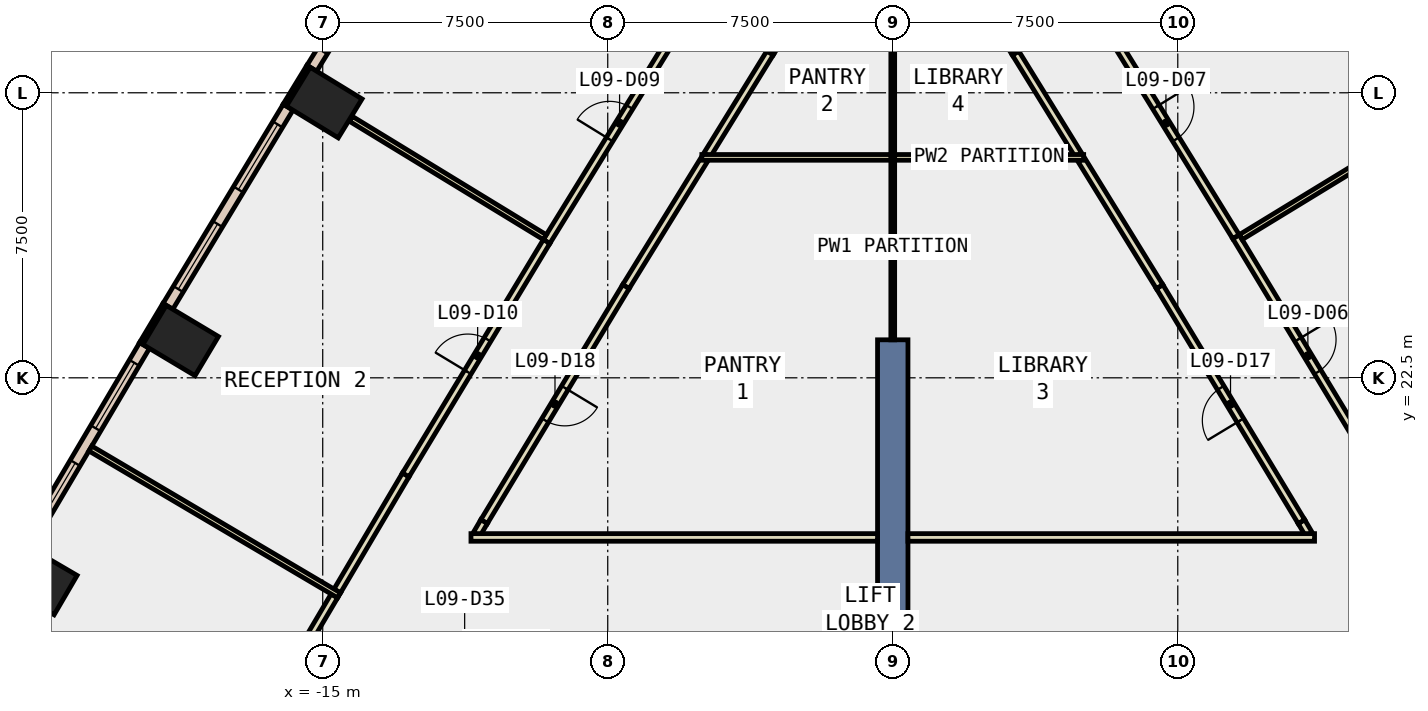
"""IFC4 building model, lengths in metres.
Left out: names, types, materials, properties, quantities, classifications, styles, units other than length and angle.
Written with IfcOpenShell. Run it as: python <this file> out.ifc"""

import sys

from ifc_helpers import new_model, si_unit, direction, frame, frame_2d, origin, origin_2d, place, context, subcontext, project, spatial, rectangle, extrude, element, fill, save


model = new_model("IFC4")
c1 = context("Model", 3, precision=1e-05, world=origin(), true_north=direction((0.0, 1.0)))
c2 = subcontext(c1, "Body", "Model", "MODEL_VIEW")
j1 = project(units=[si_unit("LENGTHUNIT", "METRE"), si_unit("PLANEANGLEUNIT", "RADIAN")], contexts=[c1])
p1 = place(None, origin())
s1 = spatial("IfcSite", under=j1, at=p1, CompositionType="ELEMENT")
p2 = place(p1, origin())
s2 = spatial("IfcBuilding", under=s1, at=p2, CompositionType="ELEMENT")
p3 = place(p2, frame((0.0, 0.0, 47.6)))
s3 = spatial("IfcBuildingStorey", under=s2, at=p3, CompositionType="ELEMENT", Elevation=47.6)
for number, where, z_axis, x_axis in (
    (1, (-14.961, 29.743, -0.4), (0.0, 0.0, 1.0), (0.522, 0.853, 0.0)),
    (2, (-18.739, 23.482, -0.4), (0.0, 0.0, 1.0), (0.513, 0.858, 0.0)),
    (3, (-22.457, 17.186, -0.4), (0.0, 0.0, 1.0), (0.504, 0.864, 0.0)),
):
    element("IfcColumn", number, at=place(p3, frame(where, z_axis=z_axis, x_axis=x_axis)), inside=s3, PredefinedType="COLUMN", context=c2, shape_type="SweptSolid", body=[
        extrude(rectangle(XDim=1.2, YDim=1.6, at=origin_2d()), origin(), (0.0, 0.0, 1.0), 4.2),
    ])
p4 = place(p3, frame((0.0, 14.5, -0.4), z_axis=(0.0, 0.0, 1.0), x_axis=(0.0, 1.0, 0.0)))
e4 = element("IfcWall", 4, at=p4, inside=s3, PredefinedType="SHEAR", context=c2, shape_type="SweptSolid", body=[
    extrude(rectangle(XDim=9.0, YDim=0.8, at=frame_2d((4.5, 0.0))), origin(), (0.0, 0.0, 1.0), 4.2),
])
for number, where, z_axis, x_axis in (
    (5, (-15.373, 30.698, 0.0), (0.0, 0.0, 1.0), (-0.522, -0.853, 0.0)),
    (6, (-19.161, 24.433, 0.0), (0.0, 0.0, 1.0), (-0.513, -0.858, 0.0)),
):
    element("IfcWall", number, at=place(p3, frame(where, z_axis=z_axis, x_axis=x_axis)), inside=s3, PredefinedType="STANDARD", context=c2, shape_type="SweptSolid", body=[
        extrude(rectangle(XDim=1.2, YDim=0.1, at=frame_2d((0.6, 0.0))), origin(), (0.0, 0.0, 1.0), 3.8),
    ])
p5 = place(p3, frame((15.287, 30.644, 0.0), z_axis=(0.0, 0.0, 1.0), x_axis=(-0.525114088226, 0.851031840971, 0.0)))
e7 = element("IfcWall", 7, at=p5, inside=s3, PredefinedType="STANDARD", context=c2, shape_type="SweptSolid", body=[
    extrude(rectangle(XDim=6.121, YDim=0.3, at=frame_2d((3.061, 0.0))), origin(), (0.0, 0.0, 1.0), 3.8),
])
p6 = place(p5, frame((0.53, 0.0, 0.0)))
e8 = element("IfcOpeningElement", 8, at=p6, cuts=e7, PredefinedType="OPENING", context=c2, shape_type="SweptSolid", body=[
    extrude(rectangle(XDim=2.0, YDim=2.4, at=frame_2d((1.0, 1.2))), frame((0.0, 0.16, 0.0), z_axis=(0.0, -1.0, 0.0), x_axis=(1.0, 0.0, 0.0)), (0.0, 0.0, 1.0), 0.32),
])
p7 = place(p5, frame((3.591, 0.0, 0.9)))
e9 = element("IfcOpeningElement", 9, at=p7, cuts=e7, PredefinedType="OPENING", context=c2, shape_type="SweptSolid", body=[
    extrude(rectangle(XDim=2.0, YDim=2.6, at=frame_2d((1.0, 1.3))), frame((0.0, 0.16, 0.0), z_axis=(0.0, -1.0, 0.0), x_axis=(1.0, 0.0, 0.0)), (0.0, 0.0, 1.0), 0.32),
])
p8 = place(p3, frame((-12.073, 35.853, 0.0), z_axis=(0.0, 0.0, 1.0), x_axis=(-0.525114088226, -0.851031840971, 0.0)))
e10 = element("IfcWall", 10, at=p8, inside=s3, PredefinedType="STANDARD", context=c2, shape_type="SweptSolid", body=[
    extrude(rectangle(XDim=6.121, YDim=0.3, at=frame_2d((3.061, 0.0))), origin(), (0.0, 0.0, 1.0), 3.8),
])
p9 = place(p8, frame((0.53, 0.0, 0.9)))
e11 = element("IfcOpeningElement", 11, at=p9, cuts=e10, PredefinedType="OPENING", context=c2, shape_type="SweptSolid", body=[
    extrude(rectangle(XDim=2.0, YDim=2.6, at=frame_2d((1.0, 1.3))), frame((0.0, 0.16, 0.0), z_axis=(0.0, -1.0, 0.0), x_axis=(1.0, 0.0, 0.0)), (0.0, 0.0, 1.0), 0.32),
])
p10 = place(p8, frame((3.591, 0.0, 0.9)))
e12 = element("IfcOpeningElement", 12, at=p10, cuts=e10, PredefinedType="OPENING", context=c2, shape_type="SweptSolid", body=[
    extrude(rectangle(XDim=2.0, YDim=2.6, at=frame_2d((1.0, 1.3))), frame((0.0, 0.16, 0.0), z_axis=(0.0, -1.0, 0.0), x_axis=(1.0, 0.0, 0.0)), (0.0, 0.0, 1.0), 0.32),
])
p11 = place(p3, frame((-15.911, 29.621, 0.0), z_axis=(0.0, 0.0, 1.0), x_axis=(-0.516699243123, -0.856166976796, 0.0)))
e13 = element("IfcWall", 13, at=p11, inside=s3, PredefinedType="STANDARD", context=c2, shape_type="SweptSolid", body=[
    extrude(rectangle(XDim=6.122, YDim=0.3, at=frame_2d((3.061, 0.0))), origin(), (0.0, 0.0, 1.0), 3.8),
])
p12 = place(p11, frame((0.53, 0.0, 0.9)))
e14 = element("IfcOpeningElement", 14, at=p12, cuts=e13, PredefinedType="OPENING", context=c2, shape_type="SweptSolid", body=[
    extrude(rectangle(XDim=2.0, YDim=2.6, at=frame_2d((1.0, 1.3))), frame((0.0, 0.16, 0.0), z_axis=(0.0, -1.0, 0.0), x_axis=(1.0, 0.0, 0.0)), (0.0, 0.0, 1.0), 0.32),
])
p13 = place(p11, frame((3.591, 0.0, 0.9)))
e15 = element("IfcOpeningElement", 15, at=p13, cuts=e13, PredefinedType="OPENING", context=c2, shape_type="SweptSolid", body=[
    extrude(rectangle(XDim=2.0, YDim=2.6, at=frame_2d((1.0, 1.3))), frame((0.0, 0.16, 0.0), z_axis=(0.0, -1.0, 0.0), x_axis=(1.0, 0.0, 0.0)), (0.0, 0.0, 1.0), 0.32),
])
p14 = place(p3, frame((-19.688, 23.351, 0.0), z_axis=(0.0, 0.0, 1.0), x_axis=(-0.508412153373, -0.861113861404, 0.0)))
e16 = element("IfcWall", 16, at=p14, inside=s3, PredefinedType="STANDARD", context=c2, shape_type="SweptSolid", body=[
    extrude(rectangle(XDim=6.121, YDim=0.3, at=frame_2d((3.061, 0.0))), origin(), (0.0, 0.0, 1.0), 3.8),
])
p15 = place(p14, frame((0.53, 0.0, 0.9)))
e17 = element("IfcOpeningElement", 17, at=p15, cuts=e16, PredefinedType="OPENING", context=c2, shape_type="SweptSolid", body=[
    extrude(rectangle(XDim=2.0, YDim=2.6, at=frame_2d((1.0, 1.3))), frame((0.0, 0.16, 0.0), z_axis=(0.0, -1.0, 0.0), x_axis=(1.0, 0.0, 0.0)), (0.0, 0.0, 1.0), 0.32),
])
p16 = place(p14, frame((3.591, 0.0, 0.9)))
e18 = element("IfcOpeningElement", 18, at=p16, cuts=e16, PredefinedType="OPENING", context=c2, shape_type="SweptSolid", body=[
    extrude(rectangle(XDim=2.0, YDim=2.6, at=frame_2d((1.0, 1.3))), frame((0.0, 0.16, 0.0), z_axis=(0.0, -1.0, 0.0), x_axis=(1.0, 0.0, 0.0)), (0.0, 0.0, 1.0), 0.32),
])
p17 = place(p3, frame((10.948, 18.386, 0.0), z_axis=(0.0, 0.0, 1.0), x_axis=(-0.506880801681, 0.862016155815, 0.0)))
e19 = element("IfcWall", 19, at=p17, inside=s3, PredefinedType="PARTITIONING", context=c2, shape_type="SweptSolid", body=[
    extrude(rectangle(XDim=0.383, YDim=0.2, at=frame_2d((0.191, 0.0))), origin(), (0.0, 0.0, 1.0), 3.8),
])
p18 = place(p3, frame((10.754, 18.716, 0.0), z_axis=(0.0, 0.0, 1.0), x_axis=(-0.516755973305, 0.856132737403, 0.0)))
e20 = element("IfcWall", 20, at=p18, inside=s3, PredefinedType="PARTITIONING", context=c2, shape_type="SweptSolid", body=[
    extrude(rectangle(XDim=7.222, YDim=0.2, at=frame_2d((3.611, 0.0))), origin(), (0.0, 0.0, 1.0), 3.8),
])
p19 = place(p18, frame((3.111, 0.0, 0.0)))
e21 = element("IfcOpeningElement", 21, at=p19, cuts=e20, PredefinedType="OPENING", context=c2, shape_type="SweptSolid", body=[
    extrude(rectangle(XDim=1.0, YDim=2.1, at=frame_2d((0.5, 1.05))), frame((0.0, 0.11, 0.0), z_axis=(0.0, -1.0, 0.0), x_axis=(1.0, 0.0, 0.0)), (0.0, 0.0, 1.0), 0.22),
])
for number, where, z_axis, x_axis in (
    (22, (7.022, 24.899, 0.0), (0.0, 0.0, 1.0), (-0.525, 0.851, 0.0)),
    (23, (-4.963, 28.236, 0.0), (0.0, 0.0, 1.0), (-0.525, -0.851, 0.0)),
):
    element("IfcWall", number, at=place(p3, frame(where, z_axis=z_axis, x_axis=x_axis)), inside=s3, PredefinedType="PARTITIONING", context=c2, shape_type="SweptSolid", body=[
        extrude(rectangle(XDim=3.921, YDim=0.2, at=frame_2d((1.961, 0.0))), origin(), (0.0, 0.0, 1.0), 3.8),
    ])
p20 = place(p3, frame((-7.022, 24.899, 0.0), z_axis=(0.0, 0.0, 1.0), x_axis=(-0.516755973305, -0.856132737403, 0.0)))
e24 = element("IfcWall", 24, at=p20, inside=s3, PredefinedType="PARTITIONING", context=c2, shape_type="SweptSolid", body=[
    extrude(rectangle(XDim=7.222, YDim=0.2, at=frame_2d((3.611, 0.0))), origin(), (0.0, 0.0, 1.0), 3.8),
])
p21 = place(p20, frame((3.111, 0.0, 0.0)))
e25 = element("IfcOpeningElement", 25, at=p21, cuts=e24, PredefinedType="OPENING", context=c2, shape_type="SweptSolid", body=[
    extrude(rectangle(XDim=1.0, YDim=2.1, at=frame_2d((0.5, 1.05))), frame((0.0, 0.11, 0.0), z_axis=(0.0, -1.0, 0.0), x_axis=(1.0, 0.0, 0.0)), (0.0, 0.0, 1.0), 0.22),
])
p22 = place(p3, frame((-10.754, 18.716, 0.0), z_axis=(0.0, 0.0, 1.0), x_axis=(-0.506880801681, -0.862016155815, 0.0)))
e26 = element("IfcWall", 26, at=p22, inside=s3, PredefinedType="PARTITIONING", context=c2, shape_type="SweptSolid", body=[
    extrude(rectangle(XDim=0.383, YDim=0.2, at=frame_2d((0.191, 0.0))), origin(), (0.0, 0.0, 1.0), 3.8),
])
p23 = place(p3, frame((4.885, 28.364, 0.0), z_axis=(0.0, 0.0, 1.0), x_axis=(-0.525078663571, 0.851053698107, 0.0)))
e27 = element("IfcWall", 27, at=p23, inside=s3, PredefinedType="PARTITIONING", context=c2, shape_type="SweptSolid", body=[
    extrude(rectangle(XDim=3.15, YDim=0.2, at=frame_2d((1.575, 0.0))), origin(), (0.0, 0.0, 1.0), 3.8),
])
p24 = place(p3, frame((3.231, 31.045, 0.0), z_axis=(0.0, 0.0, 1.0), x_axis=(-0.533294550084, 0.845929620507, 0.0)))
e28 = element("IfcWall", 28, at=p24, inside=s3, PredefinedType="PARTITIONING", context=c2, shape_type="SweptSolid", body=[
    extrude(rectangle(XDim=5.959, YDim=0.2, at=frame_2d((2.979, 0.0))), origin(), (0.0, 0.0, 1.0), 3.8),
])
p25 = place(p24, frame((2.479, 0.0, 0.0)))
e29 = element("IfcOpeningElement", 29, at=p25, cuts=e28, PredefinedType="OPENING", context=c2, shape_type="SweptSolid", body=[
    extrude(rectangle(XDim=1.0, YDim=2.1, at=frame_2d((0.5, 1.05))), frame((0.0, 0.11, 0.0), z_axis=(0.0, -1.0, 0.0), x_axis=(1.0, 0.0, 0.0)), (0.0, 0.0, 1.0), 0.22),
])
p26 = place(p3, frame((0.027, 36.213, 0.0), z_axis=(0.0, 0.0, 1.0), x_axis=(-0.533299680037, -0.845926386438, 0.0)))
e30 = element("IfcWall", 30, at=p26, inside=s3, PredefinedType="PARTITIONING", context=c2, shape_type="SweptSolid", body=[
    extrude(rectangle(XDim=6.109, YDim=0.2, at=frame_2d((3.055, 0.0))), origin(), (0.0, 0.0, 1.0), 3.8),
])
p27 = place(p26, frame((2.554, 0.0, 0.0)))
e31 = element("IfcOpeningElement", 31, at=p27, cuts=e30, PredefinedType="OPENING", context=c2, shape_type="SweptSolid", body=[
    extrude(rectangle(XDim=1.0, YDim=2.1, at=frame_2d((0.5, 1.05))), frame((0.0, 0.11, 0.0), z_axis=(0.0, -1.0, 0.0), x_axis=(1.0, 0.0, 0.0)), (0.0, 0.0, 1.0), 0.22),
])
p28 = place(p3, frame((-3.231, 31.045, 0.0), z_axis=(0.0, 0.0, 1.0), x_axis=(-0.525078663571, -0.851053698107, 0.0)))
e32 = element("IfcWall", 32, at=p28, inside=s3, PredefinedType="PARTITIONING", context=c2, shape_type="SweptSolid", body=[
    extrude(rectangle(XDim=3.15, YDim=0.2, at=frame_2d((1.575, 0.0))), origin(), (0.0, 0.0, 1.0), 3.8),
])
p29 = place(p3, frame((9.032, 26.213, 0.0), z_axis=(0.0, 0.0, 1.0), x_axis=(0.516789314756, -0.856112611841, 0.0)))
e33 = element("IfcWall", 33, at=p29, inside=s3, PredefinedType="PARTITIONING", context=c2, shape_type="SweptSolid", body=[
    extrude(rectangle(XDim=7.32, YDim=0.2, at=frame_2d((3.66, 0.0))), origin(), (0.0, 0.0, 1.0), 3.8),
])
p30 = place(p29, frame((3.16, 0.0, 0.0)))
e34 = element("IfcOpeningElement", 34, at=p30, cuts=e33, PredefinedType="OPENING", context=c2, shape_type="SweptSolid", body=[
    extrude(rectangle(XDim=1.0, YDim=2.1, at=frame_2d((0.5, 1.05))), frame((0.0, 0.11, 0.0), z_axis=(0.0, -1.0, 0.0), x_axis=(1.0, 0.0, 0.0)), (0.0, 0.0, 1.0), 0.22),
])
p31 = place(p3, frame((5.267, 32.315, 0.0), z_axis=(0.0, 0.0, 1.0), x_axis=(0.524988204957, -0.851109502153, 0.0)))
e35 = element("IfcWall", 35, at=p31, inside=s3, PredefinedType="PARTITIONING", context=c2, shape_type="SweptSolid", body=[
    extrude(rectangle(XDim=7.169, YDim=0.2, at=frame_2d((3.585, 0.0))), origin(), (0.0, 0.0, 1.0), 3.8),
])
p32 = place(p31, frame((3.16, 0.0, 0.0)))
e36 = element("IfcOpeningElement", 36, at=p32, cuts=e35, PredefinedType="OPENING", context=c2, shape_type="SweptSolid", body=[
    extrude(rectangle(XDim=1.0, YDim=2.1, at=frame_2d((0.5, 1.05))), frame((0.0, 0.11, 0.0), z_axis=(0.0, -1.0, 0.0), x_axis=(1.0, 0.0, 0.0)), (0.0, 0.0, 1.0), 0.22),
])
p33 = place(p3, frame((-9.11, 26.085, 0.0), z_axis=(0.0, 0.0, 1.0), x_axis=(0.525007100846, 0.85109784635, 0.0)))
e37 = element("IfcWall", 37, at=p33, inside=s3, PredefinedType="PARTITIONING", context=c2, shape_type="SweptSolid", body=[
    extrude(rectangle(XDim=7.32, YDim=0.2, at=frame_2d((3.66, 0.0))), origin(), (0.0, 0.0, 1.0), 3.8),
])
p34 = place(p33, frame((3.16, 0.0, 0.0)))
e38 = element("IfcOpeningElement", 38, at=p34, cuts=e37, PredefinedType="OPENING", context=c2, shape_type="SweptSolid", body=[
    extrude(rectangle(XDim=1.0, YDim=2.1, at=frame_2d((0.5, 1.05))), frame((0.0, 0.11, 0.0), z_axis=(0.0, -1.0, 0.0), x_axis=(1.0, 0.0, 0.0)), (0.0, 0.0, 1.0), 0.22),
])
p35 = place(p3, frame((-14.618, 16.891, 0.0), z_axis=(0.0, 0.0, 1.0), x_axis=(0.508267810274, 0.861199067022, 0.0)))
e39 = element("IfcWall", 39, at=p35, inside=s3, PredefinedType="PARTITIONING", context=c2, shape_type="SweptSolid", body=[
    extrude(rectangle(XDim=3.547, YDim=0.2, at=frame_2d((1.774, 0.0))), origin(), (0.0, 0.0, 1.0), 3.8),
])
p36 = place(p3, frame((-12.815, 19.946, 0.0), z_axis=(0.0, 0.0, 1.0), x_axis=(0.516822021522, 0.856092867667, 0.0)))
e40 = element("IfcWall", 40, at=p36, inside=s3, PredefinedType="PARTITIONING", context=c2, shape_type="SweptSolid", body=[
    extrude(rectangle(XDim=7.171, YDim=0.2, at=frame_2d((3.585, 0.0))), origin(), (0.0, 0.0, 1.0), 3.8),
])
p37 = place(p36, frame((3.16, 0.0, 0.0)))
e41 = element("IfcOpeningElement", 41, at=p37, cuts=e40, PredefinedType="OPENING", context=c2, shape_type="SweptSolid", body=[
    extrude(rectangle(XDim=1.0, YDim=2.1, at=frame_2d((0.5, 1.05))), frame((0.0, 0.11, 0.0), z_axis=(0.0, -1.0, 0.0), x_axis=(1.0, 0.0, 0.0)), (0.0, 0.0, 1.0), 0.22),
])
p38 = place(p3, frame((-16.498, 13.707, 0.0), z_axis=(0.0, 0.0, 1.0), x_axis=(0.508471945541, 0.861078556578, 0.0)))
e42 = element("IfcWall", 42, at=p38, inside=s3, PredefinedType="PARTITIONING", context=c2, shape_type="SweptSolid", body=[
    extrude(rectangle(XDim=3.548, YDim=0.2, at=frame_2d((1.774, 0.0))), origin(), (0.0, 0.0, 1.0), 3.8),
])
for number, where, z_axis, x_axis in (
    (43, (0.4, 18.3, 0.0), (0.0, 0.0, 1.0), (1.0, 0.0, 0.0)),
    (44, (-11.099, 18.3, 0.0), (0.0, 0.0, 1.0), (1.0, 0.0, 0.0)),
):
    element("IfcWall", number, at=place(p3, frame(where, z_axis=z_axis, x_axis=x_axis)), inside=s3, PredefinedType="PARTITIONING", context=c2, shape_type="SweptSolid", body=[
        extrude(rectangle(XDim=10.699, YDim=0.2, at=frame_2d((5.35, 0.0))), origin(), (0.0, 0.0, 1.0), 3.8),
    ])
p39 = place(p3, frame((0.0, 23.5, 0.0), z_axis=(0.0, 0.0, 1.0), x_axis=(0.0, 1.0, 0.0)))
e45 = element("IfcWall", 45, at=p39, inside=s3, PredefinedType="PARTITIONING", context=c2, shape_type="SweptSolid", body=[
    extrude(rectangle(XDim=4.875, YDim=0.1, at=frame_2d((2.438, 0.0))), origin(), (0.0, 0.0, 1.0), 3.8),
])
for number, where, z_axis, x_axis in (
    (46, (0.05, 28.3, 0.0), (0.0, 0.0, 1.0), (1.0, 0.0, 0.0)),
    (47, (-5.024, 28.3, 0.0), (0.0, 0.0, 1.0), (1.0, 0.0, 0.0)),
):
    element("IfcWall", number, at=place(p3, frame(where, z_axis=z_axis, x_axis=x_axis)), inside=s3, PredefinedType="PARTITIONING", context=c2, shape_type="SweptSolid", body=[
        extrude(rectangle(XDim=4.974, YDim=0.15, at=frame_2d((2.487, 0.0))), origin(), (0.0, 0.0, 1.0), 3.8),
    ])
p40 = place(p3, frame((0.0, 28.375, 0.0), z_axis=(0.0, 0.0, 1.0), x_axis=(0.0, 1.0, 0.0)))
e48 = element("IfcWall", 48, at=p40, inside=s3, PredefinedType="PARTITIONING", context=c2, shape_type="SweptSolid", body=[
    extrude(rectangle(XDim=7.895, YDim=0.1, at=frame_2d((3.948, 0.0))), origin(), (0.0, 0.0, 1.0), 3.8),
])
for number, where, z_axis, x_axis in (
    (49, (9.156, 26.201, 0.0), (0.0, 0.0, 1.0), (0.854, 0.521, 0.0)),
    (50, (-9.156, 26.201, 0.0), (0.0, 0.0, 1.0), (-0.854, 0.521, 0.0)),
):
    element("IfcWall", number, at=place(p3, frame(where, z_axis=z_axis, x_axis=x_axis)), inside=s3, PredefinedType="PARTITIONING", context=c2, shape_type="SweptSolid", body=[
        extrude(rectangle(XDim=5.98, YDim=0.15, at=frame_2d((2.99, 0.0))), origin(), (0.0, 0.0, 1.0), 3.8),
    ])
p41 = place(p3, frame((-14.57, 16.776, 0.0), z_axis=(0.0, 0.0, 1.0), x_axis=(-0.861124703857, 0.508393788718, 0.0)))
e51 = element("IfcWall", 51, at=p41, inside=s3, PredefinedType="PARTITIONING", context=c2, shape_type="SweptSolid", body=[
    extrude(rectangle(XDim=7.6, YDim=0.15, at=frame_2d((3.8, 0.0))), origin(), (0.0, 0.0, 1.0), 3.8),
])
p42 = place(p12, origin())
e52 = element("IfcWindow", 52, at=p42, inside=s3, PartitioningType="SINGLE_PANEL", PredefinedType="WINDOW", context=c2, shape_type="SweptSolid", body=[
    extrude(rectangle(XDim=2.0, YDim=2.6, at=frame_2d((1.0, 1.3))), frame((0.0, 0.03, 0.0), z_axis=(0.0, -1.0, 0.0), x_axis=(1.0, 0.0, 0.0)), (0.0, 0.0, 1.0), 0.06),
])
fill(e14, e52)
p43 = place(p13, origin())
e53 = element("IfcWindow", 53, at=p43, inside=s3, PartitioningType="SINGLE_PANEL", PredefinedType="WINDOW", context=c2, shape_type="SweptSolid", body=[
    extrude(rectangle(XDim=2.0, YDim=2.6, at=frame_2d((1.0, 1.3))), frame((0.0, 0.03, 0.0), z_axis=(0.0, -1.0, 0.0), x_axis=(1.0, 0.0, 0.0)), (0.0, 0.0, 1.0), 0.06),
])
fill(e15, e53)
p44 = place(p15, origin())
e54 = element("IfcWindow", 54, at=p44, inside=s3, PartitioningType="SINGLE_PANEL", PredefinedType="WINDOW", context=c2, shape_type="SweptSolid", body=[
    extrude(rectangle(XDim=2.0, YDim=2.6, at=frame_2d((1.0, 1.3))), frame((0.0, 0.03, 0.0), z_axis=(0.0, -1.0, 0.0), x_axis=(1.0, 0.0, 0.0)), (0.0, 0.0, 1.0), 0.06),
])
fill(e17, e54)
p45 = place(p16, origin())
e55 = element("IfcWindow", 55, at=p45, inside=s3, PartitioningType="SINGLE_PANEL", PredefinedType="WINDOW", context=c2, shape_type="SweptSolid", body=[
    extrude(rectangle(XDim=2.0, YDim=2.6, at=frame_2d((1.0, 1.3))), frame((0.0, 0.03, 0.0), z_axis=(0.0, -1.0, 0.0), x_axis=(1.0, 0.0, 0.0)), (0.0, 0.0, 1.0), 0.06),
])
fill(e18, e55)
p46 = place(p30, origin())
e56 = element("IfcDoor", 56, at=p46, inside=s3, OperationType="SINGLE_SWING_LEFT", PredefinedType="DOOR", context=c2, shape_type="SweptSolid", body=[
    extrude(rectangle(XDim=1.0, YDim=2.1, at=frame_2d((0.5, 1.05))), frame((0.0, 0.025, 0.0), z_axis=(0.0, -1.0, 0.0), x_axis=(1.0, 0.0, 0.0)), (0.0, 0.0, 1.0), 0.05),
])
fill(e34, e56)
p47 = place(p32, origin())
e57 = element("IfcDoor", 57, at=p47, inside=s3, OperationType="SINGLE_SWING_RIGHT", PredefinedType="DOOR", context=c2, shape_type="SweptSolid", body=[
    extrude(rectangle(XDim=1.0, YDim=2.1, at=frame_2d((0.5, 1.05))), frame((0.0, 0.025, 0.0), z_axis=(0.0, -1.0, 0.0), x_axis=(1.0, 0.0, 0.0)), (0.0, 0.0, 1.0), 0.05),
])
fill(e36, e57)
p48 = place(p34, origin())
e58 = element("IfcDoor", 58, at=p48, inside=s3, OperationType="SINGLE_SWING_RIGHT", PredefinedType="DOOR", context=c2, shape_type="SweptSolid", body=[
    extrude(rectangle(XDim=1.0, YDim=2.1, at=frame_2d((0.5, 1.05))), frame((0.0, 0.025, 0.0), z_axis=(0.0, -1.0, 0.0), x_axis=(1.0, 0.0, 0.0)), (0.0, 0.0, 1.0), 0.05),
])
fill(e38, e58)
p49 = place(p37, origin())
e59 = element("IfcDoor", 59, at=p49, inside=s3, OperationType="SINGLE_SWING_LEFT", PredefinedType="DOOR", context=c2, shape_type="SweptSolid", body=[
    extrude(rectangle(XDim=1.0, YDim=2.1, at=frame_2d((0.5, 1.05))), frame((0.0, 0.025, 0.0), z_axis=(0.0, -1.0, 0.0), x_axis=(1.0, 0.0, 0.0)), (0.0, 0.0, 1.0), 0.05),
])
fill(e41, e59)
p50 = place(p19, origin())
e60 = element("IfcDoor", 60, at=p50, inside=s3, OperationType="SINGLE_SWING_LEFT", PredefinedType="DOOR", context=c2, shape_type="SweptSolid", body=[
    extrude(rectangle(XDim=1.0, YDim=2.1, at=frame_2d((0.5, 1.05))), frame((0.0, 0.025, 0.0), z_axis=(0.0, -1.0, 0.0), x_axis=(1.0, 0.0, 0.0)), (0.0, 0.0, 1.0), 0.05),
])
fill(e21, e60)
p51 = place(p21, origin())
e61 = element("IfcDoor", 61, at=p51, inside=s3, OperationType="SINGLE_SWING_LEFT", PredefinedType="DOOR", context=c2, shape_type="SweptSolid", body=[
    extrude(rectangle(XDim=1.0, YDim=2.1, at=frame_2d((0.5, 1.05))), frame((0.0, 0.025, 0.0), z_axis=(0.0, -1.0, 0.0), x_axis=(1.0, 0.0, 0.0)), (0.0, 0.0, 1.0), 0.05),
])
fill(e25, e61)
save(model, sys.argv[1])
